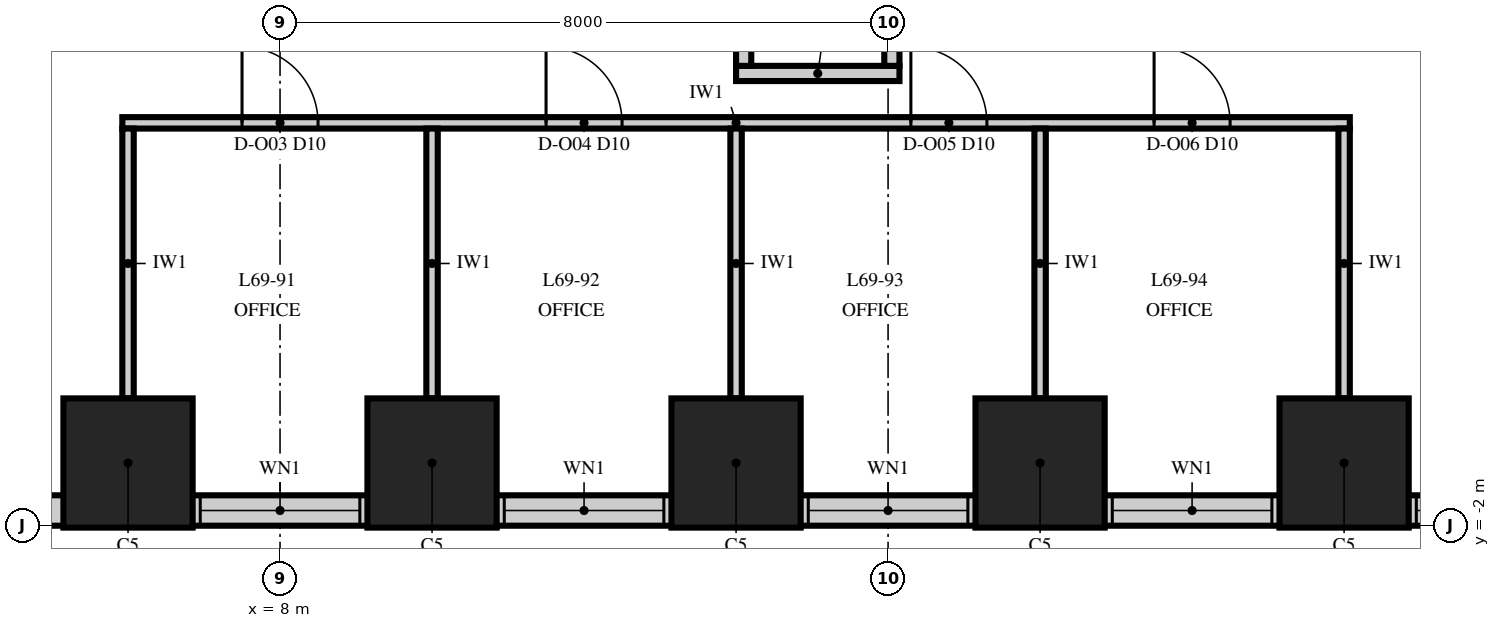
"""IFC4 building model, lengths in metres.
Left out: names, types, materials, properties, quantities, classifications, styles, units other than length and angle.
Written with IfcOpenShell. Run it as: python <this file> out.ifc"""

import sys

from ifc_helpers import new_model, si_unit, direction, frame, frame_2d, origin, origin_2d, place, context, subcontext, project, spatial, rectangle, extrude, element, fill, save


model = new_model("IFC4")
c1 = context("Model", 3, precision=1e-05, world=origin(), true_north=direction((0.0, 1.0)))
c2 = subcontext(c1, "Body", "Model", "MODEL_VIEW")
j1 = project(units=[si_unit("LENGTHUNIT", "METRE"), si_unit("PLANEANGLEUNIT", "RADIAN")], contexts=[c1])
p1 = place(None, origin())
s1 = spatial("IfcSite", under=j1, at=p1, CompositionType="ELEMENT")
p2 = place(p1, origin())
s2 = spatial("IfcBuilding", under=s1, at=p2, CompositionType="ELEMENT")
p3 = place(p2, frame((0.0, 0.0, 296.0)))
s3 = spatial("IfcBuildingStorey", under=s2, at=p3, CompositionType="ELEMENT", Elevation=296.0)
for number, where, z_axis, x_axis in (
    (1, (6.0, -1.175, -0.25), (0.0, 0.0, 1.0), (1.0, 0.0, 0.0)),
    (2, (10.0, -1.175, -0.25), (0.0, 0.0, 1.0), (1.0, 0.0, 0.0)),
    (3, (14.0, -1.175, -0.25), (0.0, 0.0, 1.0), (1.0, 0.0, 0.0)),
    (4, (18.0, -1.175, -0.25), (0.0, 0.0, 1.0), (1.0, 0.0, 0.0)),
    (5, (22.0, -1.175, -0.25), (0.0, 0.0, 1.0), (1.0, 0.0, 0.0)),
):
    element("IfcColumn", number, at=place(p3, frame(where, z_axis=z_axis, x_axis=x_axis)), inside=s3, PredefinedType="COLUMN", context=c2, shape_type="SweptSolid", body=[
        extrude(rectangle(XDim=1.7, YDim=1.7, at=origin_2d()), origin(), (0.0, 0.0, 1.0), 4.25),
    ])
p4 = place(p3, frame((-26.0, -1.8, 0.0), z_axis=(0.0, 0.0, 1.0), x_axis=(1.0, 0.0, 0.0)))
e6 = element("IfcWall", 6, at=p4, inside=s3, PredefinedType="SOLIDWALL", context=c2, shape_type="SweptSolid", body=[
    extrude(rectangle(XDim=52.0, YDim=0.4, at=frame_2d((26.0, 0.0))), origin(), (0.0, 0.0, 1.0), 2.0),
])
p5 = place(p4, frame((0.95, 0.0, 0.8)))
e7 = element("IfcOpeningElement", 7, at=p5, cuts=e6, PredefinedType="OPENING", context=c2, shape_type="SweptSolid", body=[
    extrude(rectangle(XDim=2.1, YDim=1.15, at=frame_2d((1.05, 0.575))), frame((0.0, 0.215, 0.0), z_axis=(0.0, -1.0, 0.0), x_axis=(1.0, 0.0, 0.0)), (0.0, 0.0, 1.0), 0.43),
])
p6 = place(p4, frame((4.95, 0.0, 0.8)))
e8 = element("IfcOpeningElement", 8, at=p6, cuts=e6, PredefinedType="OPENING", context=c2, shape_type="SweptSolid", body=[
    extrude(rectangle(XDim=2.1, YDim=1.15, at=frame_2d((1.05, 0.575))), frame((0.0, 0.215, 0.0), z_axis=(0.0, -1.0, 0.0), x_axis=(1.0, 0.0, 0.0)), (0.0, 0.0, 1.0), 0.43),
])
p7 = place(p4, frame((8.95, 0.0, 0.8)))
e9 = element("IfcOpeningElement", 9, at=p7, cuts=e6, PredefinedType="OPENING", context=c2, shape_type="SweptSolid", body=[
    extrude(rectangle(XDim=2.1, YDim=1.15, at=frame_2d((1.05, 0.575))), frame((0.0, 0.215, 0.0), z_axis=(0.0, -1.0, 0.0), x_axis=(1.0, 0.0, 0.0)), (0.0, 0.0, 1.0), 0.43),
])
p8 = place(p4, frame((12.95, 0.0, 0.8)))
e10 = element("IfcOpeningElement", 10, at=p8, cuts=e6, PredefinedType="OPENING", context=c2, shape_type="SweptSolid", body=[
    extrude(rectangle(XDim=2.1, YDim=1.15, at=frame_2d((1.05, 0.575))), frame((0.0, 0.215, 0.0), z_axis=(0.0, -1.0, 0.0), x_axis=(1.0, 0.0, 0.0)), (0.0, 0.0, 1.0), 0.43),
])
p9 = place(p4, frame((16.95, 0.0, 0.8)))
e11 = element("IfcOpeningElement", 11, at=p9, cuts=e6, PredefinedType="OPENING", context=c2, shape_type="SweptSolid", body=[
    extrude(rectangle(XDim=2.1, YDim=1.15, at=frame_2d((1.05, 0.575))), frame((0.0, 0.215, 0.0), z_axis=(0.0, -1.0, 0.0), x_axis=(1.0, 0.0, 0.0)), (0.0, 0.0, 1.0), 0.43),
])
p10 = place(p4, frame((21.1, 0.0, 0.0)))
e12 = element("IfcOpeningElement", 12, at=p10, cuts=e6, PredefinedType="OPENING", context=c2, shape_type="SweptSolid", body=[
    extrude(rectangle(XDim=1.8, YDim=2.0, at=frame_2d((0.9, 1.0))), frame((0.0, 0.215, 0.0), z_axis=(0.0, -1.0, 0.0), x_axis=(1.0, 0.0, 0.0)), (0.0, 0.0, 1.0), 0.43),
])
p11 = place(p4, frame((24.95, 0.0, 0.8)))
e13 = element("IfcOpeningElement", 13, at=p11, cuts=e6, PredefinedType="OPENING", context=c2, shape_type="SweptSolid", body=[
    extrude(rectangle(XDim=2.1, YDim=1.15, at=frame_2d((1.05, 0.575))), frame((0.0, 0.215, 0.0), z_axis=(0.0, -1.0, 0.0), x_axis=(1.0, 0.0, 0.0)), (0.0, 0.0, 1.0), 0.43),
])
p12 = place(p4, frame((29.1, 0.0, 0.0)))
e14 = element("IfcOpeningElement", 14, at=p12, cuts=e6, PredefinedType="OPENING", context=c2, shape_type="SweptSolid", body=[
    extrude(rectangle(XDim=1.8, YDim=2.0, at=frame_2d((0.9, 1.0))), frame((0.0, 0.215, 0.0), z_axis=(0.0, -1.0, 0.0), x_axis=(1.0, 0.0, 0.0)), (0.0, 0.0, 1.0), 0.43),
])
p13 = place(p4, frame((32.95, 0.0, 0.8)))
e15 = element("IfcOpeningElement", 15, at=p13, cuts=e6, PredefinedType="OPENING", context=c2, shape_type="SweptSolid", body=[
    extrude(rectangle(XDim=2.1, YDim=1.15, at=frame_2d((1.05, 0.575))), frame((0.0, 0.215, 0.0), z_axis=(0.0, -1.0, 0.0), x_axis=(1.0, 0.0, 0.0)), (0.0, 0.0, 1.0), 0.43),
])
p14 = place(p4, frame((36.95, 0.0, 0.8)))
e16 = element("IfcOpeningElement", 16, at=p14, cuts=e6, PredefinedType="OPENING", context=c2, shape_type="SweptSolid", body=[
    extrude(rectangle(XDim=2.1, YDim=1.15, at=frame_2d((1.05, 0.575))), frame((0.0, 0.215, 0.0), z_axis=(0.0, -1.0, 0.0), x_axis=(1.0, 0.0, 0.0)), (0.0, 0.0, 1.0), 0.43),
])
p15 = place(p4, frame((40.95, 0.0, 0.8)))
e17 = element("IfcOpeningElement", 17, at=p15, cuts=e6, PredefinedType="OPENING", context=c2, shape_type="SweptSolid", body=[
    extrude(rectangle(XDim=2.1, YDim=1.15, at=frame_2d((1.05, 0.575))), frame((0.0, 0.215, 0.0), z_axis=(0.0, -1.0, 0.0), x_axis=(1.0, 0.0, 0.0)), (0.0, 0.0, 1.0), 0.43),
])
p16 = place(p4, frame((44.95, 0.0, 0.8)))
e18 = element("IfcOpeningElement", 18, at=p16, cuts=e6, PredefinedType="OPENING", context=c2, shape_type="SweptSolid", body=[
    extrude(rectangle(XDim=2.1, YDim=1.15, at=frame_2d((1.05, 0.575))), frame((0.0, 0.215, 0.0), z_axis=(0.0, -1.0, 0.0), x_axis=(1.0, 0.0, 0.0)), (0.0, 0.0, 1.0), 0.43),
])
p17 = place(p4, frame((48.95, 0.0, 0.8)))
e19 = element("IfcOpeningElement", 19, at=p17, cuts=e6, PredefinedType="OPENING", context=c2, shape_type="SweptSolid", body=[
    extrude(rectangle(XDim=2.1, YDim=1.15, at=frame_2d((1.05, 0.575))), frame((0.0, 0.215, 0.0), z_axis=(0.0, -1.0, 0.0), x_axis=(1.0, 0.0, 0.0)), (0.0, 0.0, 1.0), 0.43),
])
p18 = place(p3, frame((5.925, 3.3, 0.0), z_axis=(0.0, 0.0, 1.0), x_axis=(1.0, 0.0, 0.0)))
e20 = element("IfcWall", 20, at=p18, inside=s3, PredefinedType="PARTITIONING", context=c2, shape_type="SweptSolid", body=[
    extrude(rectangle(XDim=16.15, YDim=0.15, at=frame_2d((8.075, 0.0))), origin(), (0.0, 0.0, 1.0), 3.23),
])
p19 = place(p18, frame((1.575, 0.0, 0.0)))
e21 = element("IfcOpeningElement", 21, at=p19, cuts=e20, PredefinedType="OPENING", context=c2, shape_type="SweptSolid", body=[
    extrude(rectangle(XDim=1.0, YDim=2.3, at=frame_2d((0.5, 1.15))), frame((0.0, 0.09, 0.0), z_axis=(0.0, -1.0, 0.0), x_axis=(1.0, 0.0, 0.0)), (0.0, 0.0, 1.0), 0.18),
])
p20 = place(p18, frame((5.575, 0.0, 0.0)))
e22 = element("IfcOpeningElement", 22, at=p20, cuts=e20, PredefinedType="OPENING", context=c2, shape_type="SweptSolid", body=[
    extrude(rectangle(XDim=1.0, YDim=2.3, at=frame_2d((0.5, 1.15))), frame((0.0, 0.09, 0.0), z_axis=(0.0, -1.0, 0.0), x_axis=(1.0, 0.0, 0.0)), (0.0, 0.0, 1.0), 0.18),
])
p21 = place(p18, frame((10.375, 0.0, 0.0)))
e23 = element("IfcOpeningElement", 23, at=p21, cuts=e20, PredefinedType="OPENING", context=c2, shape_type="SweptSolid", body=[
    extrude(rectangle(XDim=1.0, YDim=2.3, at=frame_2d((0.5, 1.15))), frame((0.0, 0.09, 0.0), z_axis=(0.0, -1.0, 0.0), x_axis=(1.0, 0.0, 0.0)), (0.0, 0.0, 1.0), 0.18),
])
p22 = place(p18, frame((13.575, 0.0, 0.0)))
e24 = element("IfcOpeningElement", 24, at=p22, cuts=e20, PredefinedType="OPENING", context=c2, shape_type="SweptSolid", body=[
    extrude(rectangle(XDim=1.0, YDim=2.3, at=frame_2d((0.5, 1.15))), frame((0.0, 0.09, 0.0), z_axis=(0.0, -1.0, 0.0), x_axis=(1.0, 0.0, 0.0)), (0.0, 0.0, 1.0), 0.18),
])
p23 = place(p3, frame((14.0, 3.95, 0.0), z_axis=(0.0, 0.0, 1.0), x_axis=(1.0, 0.0, 0.0)))
e25 = element("IfcWall", 25, at=p23, inside=s3, PredefinedType="PARTITIONING", context=c2, shape_type="SweptSolid", body=[
    extrude(rectangle(XDim=2.15, YDim=0.2, at=frame_2d((1.075, 0.0))), origin(), (0.0, 0.0, 1.0), 3.85),
])
for number, where, z_axis, x_axis in (
    (26, (6.0, -0.325, 0.0), (0.0, 0.0, 1.0), (0.0, 1.0, 0.0)),
    (27, (10.0, -0.325, 0.0), (0.0, 0.0, 1.0), (0.0, 1.0, 0.0)),
    (28, (14.0, -0.325, 0.0), (0.0, 0.0, 1.0), (0.0, 1.0, 0.0)),
):
    element("IfcWall", number, at=place(p3, frame(where, z_axis=z_axis, x_axis=x_axis)), inside=s3, PredefinedType="PARTITIONING", context=c2, shape_type="SweptSolid", body=[
        extrude(rectangle(XDim=3.55, YDim=0.15, at=frame_2d((1.775, 0.0))), origin(), (0.0, 0.0, 1.0), 3.23),
    ])
p24 = place(p3, frame((14.1, 4.05, 0.0), z_axis=(0.0, 0.0, 1.0), x_axis=(0.0, 1.0, 0.0)))
e29 = element("IfcWall", 29, at=p24, inside=s3, PredefinedType="PARTITIONING", context=c2, shape_type="SweptSolid", body=[
    extrude(rectangle(XDim=1.82, YDim=0.2, at=frame_2d((0.91, 0.0))), origin(), (0.0, 0.0, 1.0), 3.85),
])
p25 = place(p3, frame((16.05, 4.05, 0.0), z_axis=(0.0, 0.0, 1.0), x_axis=(0.0, 1.0, 0.0)))
e30 = element("IfcWall", 30, at=p25, inside=s3, PredefinedType="PARTITIONING", context=c2, shape_type="SweptSolid", body=[
    extrude(rectangle(XDim=21.9, YDim=0.2, at=frame_2d((10.95, 0.0))), origin(), (0.0, 0.0, 1.0), 2.842),
])
p26 = place(p25, frame((0.25, 0.0, 0.0)))
e31 = element("IfcOpeningElement", 31, at=p26, cuts=e30, PredefinedType="OPENING", context=c2, shape_type="SweptSolid", body=[
    extrude(rectangle(XDim=1.2, YDim=2.4, at=frame_2d((0.6, 1.2))), frame((0.0, 0.115, 0.0), z_axis=(0.0, -1.0, 0.0), x_axis=(1.0, 0.0, 0.0)), (0.0, 0.0, 1.0), 0.23),
])
p27 = place(p25, frame((7.35, 0.0, 0.0)))
e32 = element("IfcOpeningElement", 32, at=p27, cuts=e30, PredefinedType="OPENING", context=c2, shape_type="SweptSolid", body=[
    extrude(rectangle(XDim=1.2, YDim=2.4, at=frame_2d((0.6, 1.2))), frame((0.0, 0.115, 0.0), z_axis=(0.0, -1.0, 0.0), x_axis=(1.0, 0.0, 0.0)), (0.0, 0.0, 1.0), 0.23),
])
p28 = place(p25, frame((20.35, 0.0, 0.0)))
e33 = element("IfcOpeningElement", 33, at=p28, cuts=e30, PredefinedType="OPENING", context=c2, shape_type="SweptSolid", body=[
    extrude(rectangle(XDim=1.2, YDim=2.4, at=frame_2d((0.6, 1.2))), frame((0.0, 0.115, 0.0), z_axis=(0.0, -1.0, 0.0), x_axis=(1.0, 0.0, 0.0)), (0.0, 0.0, 1.0), 0.23),
])
for number, where, z_axis, x_axis in (
    (34, (18.0, -0.325, 0.0), (0.0, 0.0, 1.0), (0.0, 1.0, 0.0)),
    (35, (22.0, -0.325, 0.0), (0.0, 0.0, 1.0), (0.0, 1.0, 0.0)),
):
    element("IfcWall", number, at=place(p3, frame(where, z_axis=z_axis, x_axis=x_axis)), inside=s3, PredefinedType="PARTITIONING", context=c2, shape_type="SweptSolid", body=[
        extrude(rectangle(XDim=3.55, YDim=0.15, at=frame_2d((1.775, 0.0))), origin(), (0.0, 0.0, 1.0), 3.23),
    ])
p29 = place(p13, origin())
e36 = element("IfcWindow", 36, at=p29, inside=s3, PartitioningType="SINGLE_PANEL", PredefinedType="WINDOW", context=c2, shape_type="SweptSolid", body=[
    extrude(rectangle(XDim=2.1, YDim=1.15, at=frame_2d((1.05, 0.575))), frame((0.0, 0.03, 0.0), z_axis=(0.0, -1.0, 0.0), x_axis=(1.0, 0.0, 0.0)), (0.0, 0.0, 1.0), 0.06),
])
fill(e15, e36)
p30 = place(p14, origin())
e37 = element("IfcWindow", 37, at=p30, inside=s3, PartitioningType="SINGLE_PANEL", PredefinedType="WINDOW", context=c2, shape_type="SweptSolid", body=[
    extrude(rectangle(XDim=2.1, YDim=1.15, at=frame_2d((1.05, 0.575))), frame((0.0, 0.03, 0.0), z_axis=(0.0, -1.0, 0.0), x_axis=(1.0, 0.0, 0.0)), (0.0, 0.0, 1.0), 0.06),
])
fill(e16, e37)
p31 = place(p15, origin())
e38 = element("IfcWindow", 38, at=p31, inside=s3, PartitioningType="SINGLE_PANEL", PredefinedType="WINDOW", context=c2, shape_type="SweptSolid", body=[
    extrude(rectangle(XDim=2.1, YDim=1.15, at=frame_2d((1.05, 0.575))), frame((0.0, 0.03, 0.0), z_axis=(0.0, -1.0, 0.0), x_axis=(1.0, 0.0, 0.0)), (0.0, 0.0, 1.0), 0.06),
])
fill(e17, e38)
p32 = place(p16, origin())
e39 = element("IfcWindow", 39, at=p32, inside=s3, PartitioningType="SINGLE_PANEL", PredefinedType="WINDOW", context=c2, shape_type="SweptSolid", body=[
    extrude(rectangle(XDim=2.1, YDim=1.15, at=frame_2d((1.05, 0.575))), frame((0.0, 0.03, 0.0), z_axis=(0.0, -1.0, 0.0), x_axis=(1.0, 0.0, 0.0)), (0.0, 0.0, 1.0), 0.06),
])
fill(e18, e39)
p33 = place(p17, origin())
e40 = element("IfcWindow", 40, at=p33, inside=s3, PartitioningType="SINGLE_PANEL", PredefinedType="WINDOW", context=c2, shape_type="SweptSolid", body=[
    extrude(rectangle(XDim=2.1, YDim=1.15, at=frame_2d((1.05, 0.575))), frame((0.0, 0.03, 0.0), z_axis=(0.0, -1.0, 0.0), x_axis=(1.0, 0.0, 0.0)), (0.0, 0.0, 1.0), 0.06),
])
fill(e19, e40)
p34 = place(p19, origin())
e41 = element("IfcDoor", 41, at=p34, inside=s3, OperationType="SINGLE_SWING_LEFT", PredefinedType="DOOR", context=c2, shape_type="SweptSolid", body=[
    extrude(rectangle(XDim=1.0, YDim=2.3, at=frame_2d((0.5, 1.15))), frame((0.0, 0.075, 0.0), z_axis=(0.0, -1.0, 0.0), x_axis=(1.0, 0.0, 0.0)), (0.0, 0.0, 1.0), 0.149),
])
fill(e21, e41)
p35 = place(p20, origin())
e42 = element("IfcDoor", 42, at=p35, inside=s3, OperationType="SINGLE_SWING_LEFT", PredefinedType="DOOR", context=c2, shape_type="SweptSolid", body=[
    extrude(rectangle(XDim=1.0, YDim=2.3, at=frame_2d((0.5, 1.15))), frame((0.0, 0.075, 0.0), z_axis=(0.0, -1.0, 0.0), x_axis=(1.0, 0.0, 0.0)), (0.0, 0.0, 1.0), 0.149),
])
fill(e22, e42)
p36 = place(p21, origin())
e43 = element("IfcDoor", 43, at=p36, inside=s3, OperationType="SINGLE_SWING_LEFT", PredefinedType="DOOR", context=c2, shape_type="SweptSolid", body=[
    extrude(rectangle(XDim=1.0, YDim=2.3, at=frame_2d((0.5, 1.15))), frame((0.0, 0.075, 0.0), z_axis=(0.0, -1.0, 0.0), x_axis=(1.0, 0.0, 0.0)), (0.0, 0.0, 1.0), 0.149),
])
fill(e23, e43)
p37 = place(p22, origin())
e44 = element("IfcDoor", 44, at=p37, inside=s3, OperationType="SINGLE_SWING_LEFT", PredefinedType="DOOR", context=c2, shape_type="SweptSolid", body=[
    extrude(rectangle(XDim=1.0, YDim=2.3, at=frame_2d((0.5, 1.15))), frame((0.0, 0.075, 0.0), z_axis=(0.0, -1.0, 0.0), x_axis=(1.0, 0.0, 0.0)), (0.0, 0.0, 1.0), 0.149),
])
fill(e24, e44)
save(model, sys.argv[1])
